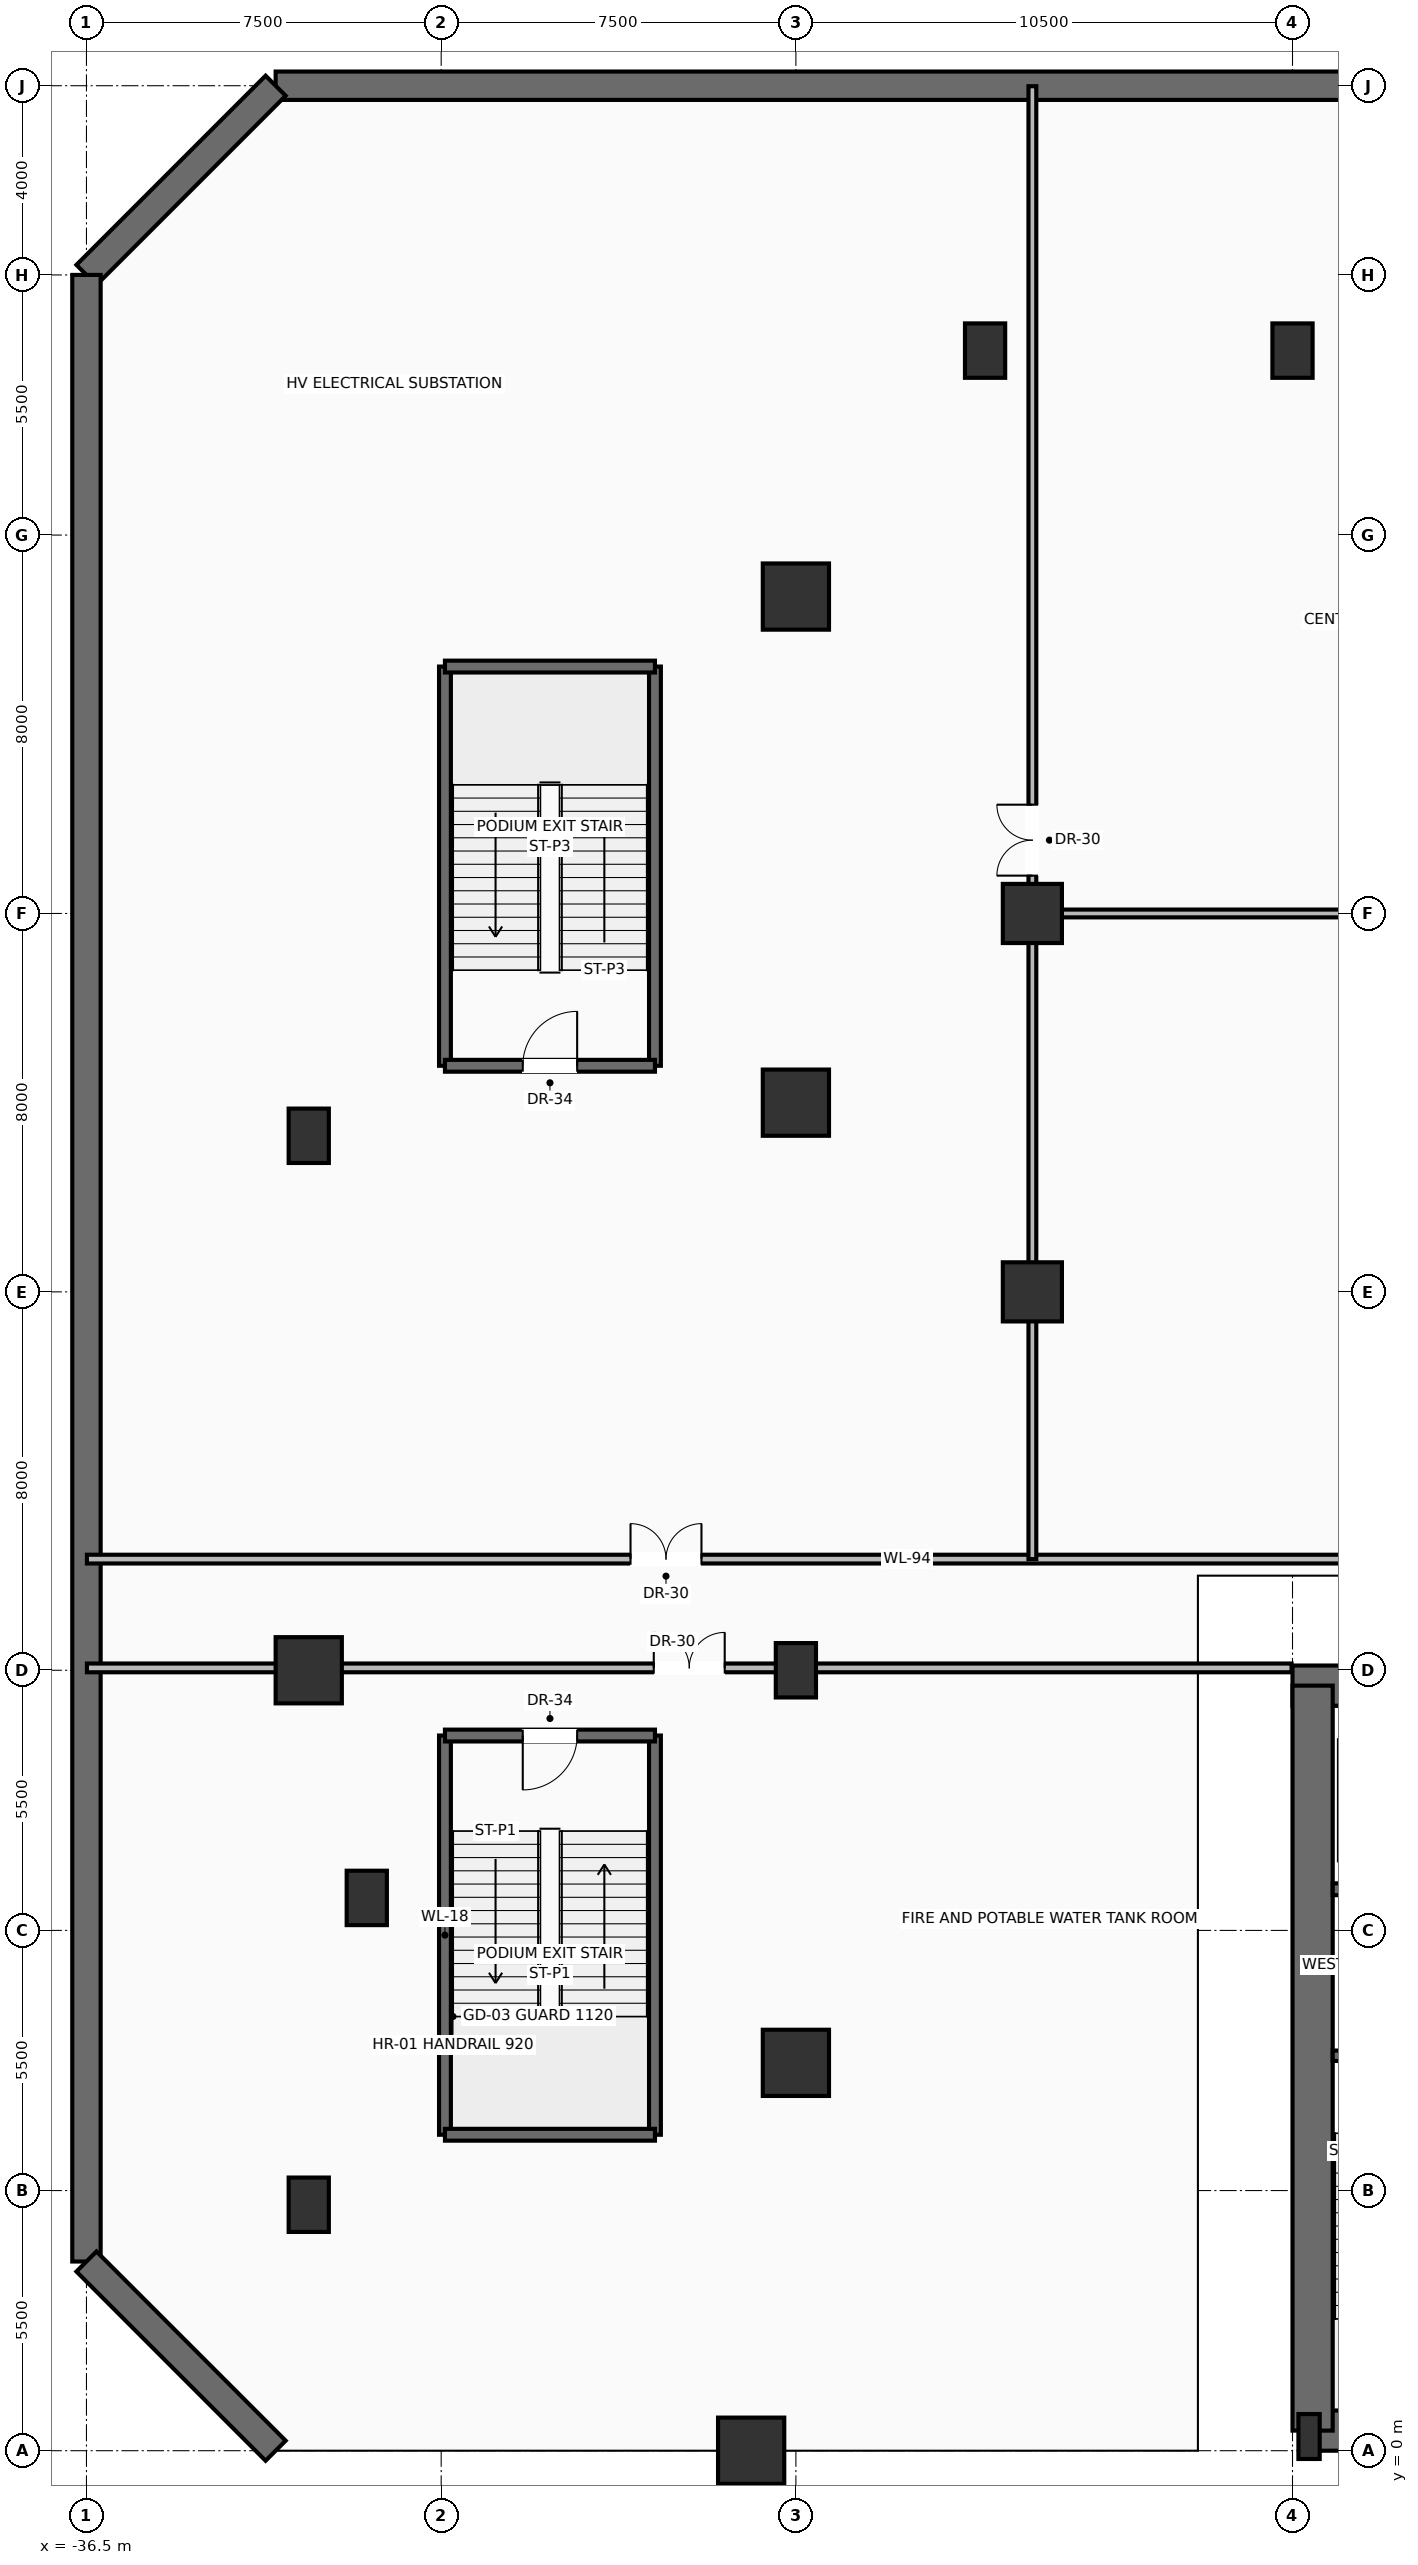
"""IFC4 building model, lengths in metres.
Left out: names, types, materials, properties, quantities, classifications, styles, units other than length and angle.
Written with IfcOpenShell. Run it as: python <this file> out.ifc"""

import sys

from ifc_helpers import new_model, si_unit, direction, frame, frame_2d, origin, origin_2d, place, context, subcontext, project, spatial, rectangle, hollow_rectangle, extrude, source, transform, mapped, element, fill, save


model = new_model("IFC4")
c1 = context("Model", 3, precision=1e-05, world=origin(), true_north=direction((0.0, 1.0)))
c2 = subcontext(c1, "Body", "Model", "MODEL_VIEW")
j1 = project(units=[si_unit("LENGTHUNIT", "METRE"), si_unit("PLANEANGLEUNIT", "RADIAN")], contexts=[c1])
p1 = place(None, origin())
s1 = spatial("IfcSite", under=j1, at=p1, CompositionType="ELEMENT")
p2 = place(p1, origin())
s2 = spatial("IfcBuilding", under=s1, at=p2, CompositionType="ELEMENT")
p3 = place(p2, frame((0.0, 0.0, -10.0)))
s3 = spatial("IfcBuildingStorey", under=s2, at=p3, CompositionType="ELEMENT", Elevation=-10.0)
p4 = place(p3, frame((32.5, 50.0, 0.0), z_axis=(0.0, 0.0, 1.0), x_axis=(-1.0, 0.0, 0.0)))
e1 = element("IfcWall", 1, at=p4, inside=s3, PredefinedType="SOLIDWALL", context=c2, shape_type="SweptSolid", body=[
    extrude(rectangle(XDim=65.0, YDim=0.6, at=frame_2d((32.5, 0.0))), origin(), (0.0, 0.0, 1.0), 4.6),
])
p5 = place(p3, frame((-32.5, 50.0, 0.0), z_axis=(0.0, 0.0, 1.0), x_axis=(-0.707106781187, -0.707106781187, 0.0)))
e2 = element("IfcWall", 2, at=p5, inside=s3, PredefinedType="SOLIDWALL", context=c2, shape_type="SweptSolid", body=[
    extrude(rectangle(XDim=5.657, YDim=0.6, at=frame_2d((2.828, 0.0))), origin(), (0.0, 0.0, 1.0), 4.6),
])
p6 = place(p3, frame((-36.5, 46.0, 0.0), z_axis=(0.0, 0.0, 1.0), x_axis=(0.0, -1.0, 0.0)))
e3 = element("IfcWall", 3, at=p6, inside=s3, PredefinedType="SOLIDWALL", context=c2, shape_type="SweptSolid", body=[
    extrude(rectangle(XDim=42.0, YDim=0.6, at=frame_2d((21.0, 0.0))), origin(), (0.0, 0.0, 1.0), 4.6),
])
p7 = place(p3, frame((-36.5, 4.0, 0.0), z_axis=(0.0, 0.0, 1.0), x_axis=(0.707106781187, -0.707106781187, 0.0)))
e4 = element("IfcWall", 4, at=p7, inside=s3, PredefinedType="SOLIDWALL", context=c2, shape_type="SweptSolid", body=[
    extrude(rectangle(XDim=5.657, YDim=0.6, at=frame_2d((2.828, 0.0))), origin(), (0.0, 0.0, 1.0), 4.6),
])
p8 = place(p3, frame((-10.65, 0.425, 0.0), z_axis=(0.0, 0.0, 1.0), x_axis=(1.0, 0.0, 0.0)))
e5 = element("IfcWall", 5, at=p8, inside=s3, PredefinedType="SHEAR", context=c2, shape_type="SweptSolid", body=[
    extrude(rectangle(XDim=21.3, YDim=0.85, at=frame_2d((10.65, 0.0))), origin(), (0.0, 0.0, 1.0), 4.6),
])
p9 = place(p3, frame((-11.0, 16.175, 0.0), z_axis=(0.0, 0.0, 1.0), x_axis=(1.0, 0.0, 0.0)))
e6 = element("IfcWall", 6, at=p9, inside=s3, PredefinedType="SHEAR", context=c2, shape_type="SweptSolid", body=[
    extrude(rectangle(XDim=22.0, YDim=0.85, at=frame_2d((11.0, 0.0))), origin(), (0.0, 0.0, 1.0), 4.6),
])
p10 = place(p9, frame((3.57, 0.0, 0.0)))
e7 = element("IfcOpeningElement", 7, at=p10, cuts=e6, PredefinedType="OPENING", context=c2, shape_type="SweptSolid", body=[
    extrude(rectangle(XDim=1.3, YDim=2.3, at=frame_2d((0.65, 1.15))), frame((0.0, 0.435, 0.0), z_axis=(0.0, -1.0, 0.0), x_axis=(1.0, 0.0, 0.0)), (0.0, 0.0, 1.0), 0.87),
])
p11 = place(p9, frame((10.0, 0.0, 0.0)))
e8 = element("IfcOpeningElement", 8, at=p11, cuts=e6, PredefinedType="OPENING", context=c2, shape_type="SweptSolid", body=[
    extrude(rectangle(XDim=2.0, YDim=2.4, at=frame_2d((1.0, 1.2))), frame((0.0, 0.435, 0.0), z_axis=(0.0, -1.0, 0.0), x_axis=(1.0, 0.0, 0.0)), (0.0, 0.0, 1.0), 0.87),
])
p12 = place(p3, frame((-10.575, 0.425, 0.0), z_axis=(0.0, 0.0, 1.0), x_axis=(0.0, 1.0, 0.0)))
e9 = element("IfcWall", 9, at=p12, inside=s3, PredefinedType="SHEAR", context=c2, shape_type="SweptSolid", body=[
    extrude(rectangle(XDim=15.75, YDim=0.85, at=frame_2d((7.875, 0.0))), origin(), (0.0, 0.0, 1.0), 4.6),
])
m1 = source(origin(), c2, "Body", "SweptSolid", [
    extrude(rectangle(XDim=0.45, YDim=0.95, at=origin_2d()), origin(), (0.0, 0.0, 1.0), 5.0),
])
p13 = place(p3, frame((-10.65, 0.3, 0.0), z_axis=(0.0, 0.0, 1.0), x_axis=(1.0, 0.0, 0.0)))
e10 = element("IfcColumn", 10, at=p13, inside=s3, PredefinedType="PILASTER", context=c2, shape_type="MappedRepresentation", body=[
    mapped(m1, transform((0.0, 0.0, 0.0), scale=1.0)),
])
m2 = source(origin(), c2, "Body", "SweptSolid", [
    extrude(hollow_rectangle(XDim=1.4, YDim=1.4, WallThickness=0.07, at=origin_2d()), origin(), (0.0, 0.0, 1.0), 5.0),
])
for number, where, z_axis, x_axis in (
    (11, (-22.446, 0.0, 0.0), (0.0, 0.0, 1.0), (1.0, 0.0, 0.0)),
    (12, (-21.5, 8.2, 0.0), (0.0, 0.0, 1.0), (1.0, 0.0, 0.0)),
    (13, (-31.8, 16.5, 0.0), (0.0, 0.0, 1.0), (1.0, 0.0, 0.0)),
    (14, (-21.5, 28.5, 0.0), (0.0, 0.0, 1.0), (1.0, 0.0, 0.0)),
    (15, (-21.5, 39.2, 0.0), (0.0, 0.0, 1.0), (1.0, 0.0, 0.0)),
):
    element("IfcColumn", number, at=place(p3, frame(where, z_axis=z_axis, x_axis=x_axis)), inside=s3, PredefinedType="COLUMN", context=c2, shape_type="MappedRepresentation", body=[
        mapped(m2, transform((0.0, 0.0, 0.0), scale=1.0)),
    ])
m3 = source(origin(), c2, "Body", "SweptSolid", [
    extrude(rectangle(XDim=0.85, YDim=1.15, at=origin_2d()), origin(), (0.0, 0.0, 1.0), 5.0),
])
for number, where, z_axis, x_axis in (
    (16, (-11.0, 44.4, 0.0), (0.0, 0.0, 1.0), (1.0, 0.0, 0.0)),
    (17, (-21.5, 16.5, 0.0), (0.0, 0.0, 1.0), (1.0, 0.0, 0.0)),
    (18, (-31.8, 5.2, 0.0), (0.0, 0.0, 1.0), (1.0, 0.0, 0.0)),
    (19, (-31.8, 27.8, 0.0), (0.0, 0.0, 1.0), (1.0, 0.0, 0.0)),
    (20, (-17.5, 44.4, 0.0), (0.0, 0.0, 1.0), (1.0, 0.0, 0.0)),
    (21, (-30.573, 11.687, 0.0), (0.0, 0.0, 1.0), (1.0, 0.0, 0.0)),
):
    element("IfcColumn", number, at=place(p3, frame(where, z_axis=z_axis, x_axis=x_axis)), inside=s3, PredefinedType="COLUMN", context=c2, shape_type="MappedRepresentation", body=[
        mapped(m3, transform((0.0, 0.0, 0.0), scale=1.0)),
    ])
m4 = source(origin(), c2, "Body", "SweptSolid", [
    extrude(rectangle(XDim=1.25, YDim=1.25, at=origin_2d()), origin(), (0.0, 0.0, 1.0), 5.0),
])
for number, where, z_axis, x_axis in (
    (22, (-16.5, 24.5, 0.0), (0.0, 0.0, 1.0), (1.0, 0.0, 0.0)),
    (23, (-16.5, 32.5, 0.0), (0.0, 0.0, 1.0), (1.0, 0.0, 0.0)),
):
    element("IfcColumn", number, at=place(p3, frame(where, z_axis=z_axis, x_axis=x_axis)), inside=s3, PredefinedType="COLUMN", context=c2, shape_type="MappedRepresentation", body=[
        mapped(m4, transform((0.0, 0.0, 0.0), scale=1.0)),
    ])
p14 = place(p3, frame((-5.5, 8.35, 0.0), z_axis=(0.0, 0.0, 1.0), x_axis=(-1.0, 0.0, 0.0)))
e24 = element("IfcWall", 24, at=p14, inside=s3, PredefinedType="SOLIDWALL", context=c2, shape_type="SweptSolid", body=[
    extrude(rectangle(XDim=4.65, YDim=0.22, at=frame_2d((2.325, 0.0))), origin(), (0.0, 0.0, 1.0), 4.6),
])
p15 = place(p14, frame((2.5, 0.0, 0.0)))
e25 = element("IfcOpeningElement", 25, at=p15, cuts=e24, PredefinedType="OPENING", context=c2, shape_type="SweptSolid", body=[
    extrude(rectangle(XDim=1.15, YDim=2.2, at=frame_2d((0.575, 1.1))), frame((0.0, 0.12, 0.0), z_axis=(0.0, -1.0, 0.0), x_axis=(1.0, 0.0, 0.0)), (0.0, 0.0, 1.0), 0.24),
])
p16 = place(p3, frame((-5.5, 11.87, 0.0), z_axis=(0.0, 0.0, 1.0), x_axis=(-1.0, 0.0, 0.0)))
e26 = element("IfcWall", 26, at=p16, inside=s3, PredefinedType="SOLIDWALL", context=c2, shape_type="SweptSolid", body=[
    extrude(rectangle(XDim=4.65, YDim=0.25, at=frame_2d((2.325, 0.0))), origin(), (0.0, 0.0, 1.0), 4.6),
])
p17 = place(p16, frame((2.95, 0.0, 0.0)))
e27 = element("IfcOpeningElement", 27, at=p17, cuts=e26, PredefinedType="OPENING", context=c2, shape_type="SweptSolid", body=[
    extrude(rectangle(XDim=1.2, YDim=2.25, at=frame_2d((0.6, 1.125))), frame((0.0, 0.135, 0.0), z_axis=(0.0, -1.0, 0.0), x_axis=(1.0, 0.0, 0.0)), (0.0, 0.0, 1.0), 0.27),
])
for number, where, z_axis, x_axis in (
    (28, (-28.92, 6.68, 0.0), (0.0, 0.0, 1.0), (0.0, 1.0, 0.0)),
    (29, (-24.48, 6.68, 0.0), (0.0, 0.0, 1.0), (0.0, 1.0, 0.0)),
):
    element("IfcWall", number, at=place(p3, frame(where, z_axis=z_axis, x_axis=x_axis)), inside=s3, PredefinedType="SOLIDWALL", context=c2, shape_type="SweptSolid", body=[
        extrude(rectangle(XDim=8.44, YDim=0.25, at=frame_2d((4.22, 0.0))), origin(), (0.0, 0.0, 1.0), 4.6),
    ])
p18 = place(p3, frame((-28.92, 6.68, 0.0), z_axis=(0.0, 0.0, 1.0), x_axis=(1.0, 0.0, 0.0)))
e30 = element("IfcWall", 30, at=p18, inside=s3, PredefinedType="SOLIDWALL", context=c2, shape_type="SweptSolid", body=[
    extrude(rectangle(XDim=4.44, YDim=0.25, at=frame_2d((2.22, 0.0))), origin(), (0.0, 0.0, 1.0), 4.6),
])
p19 = place(p3, frame((-24.48, 15.12, 0.0), z_axis=(0.0, 0.0, 1.0), x_axis=(-1.0, 0.0, 0.0)))
e31 = element("IfcWall", 31, at=p19, inside=s3, PredefinedType="SOLIDWALL", context=c2, shape_type="SweptSolid", body=[
    extrude(rectangle(XDim=4.44, YDim=0.25, at=frame_2d((2.22, 0.0))), origin(), (0.0, 0.0, 1.0), 4.6),
])
p20 = place(p19, frame((1.645, 0.0, 0.0)))
e32 = element("IfcOpeningElement", 32, at=p20, cuts=e31, PredefinedType="OPENING", context=c2, shape_type="SweptSolid", body=[
    extrude(rectangle(XDim=1.15, YDim=2.2, at=frame_2d((0.575, 1.1))), frame((0.0, 0.135, 0.0), z_axis=(0.0, -1.0, 0.0), x_axis=(1.0, 0.0, 0.0)), (0.0, 0.0, 1.0), 0.27),
])
for number, where, z_axis, x_axis in (
    (33, (-28.92, 29.28, 0.0), (0.0, 0.0, 1.0), (0.0, 1.0, 0.0)),
    (34, (-24.48, 29.28, 0.0), (0.0, 0.0, 1.0), (0.0, 1.0, 0.0)),
):
    element("IfcWall", number, at=place(p3, frame(where, z_axis=z_axis, x_axis=x_axis)), inside=s3, PredefinedType="SOLIDWALL", context=c2, shape_type="SweptSolid", body=[
        extrude(rectangle(XDim=8.44, YDim=0.25, at=frame_2d((4.22, 0.0))), origin(), (0.0, 0.0, 1.0), 4.6),
    ])
p21 = place(p3, frame((-28.92, 29.28, 0.0), z_axis=(0.0, 0.0, 1.0), x_axis=(1.0, 0.0, 0.0)))
e35 = element("IfcWall", 35, at=p21, inside=s3, PredefinedType="SOLIDWALL", context=c2, shape_type="SweptSolid", body=[
    extrude(rectangle(XDim=4.44, YDim=0.25, at=frame_2d((2.22, 0.0))), origin(), (0.0, 0.0, 1.0), 4.6),
])
p22 = place(p21, frame((1.645, 0.0, 0.0)))
e36 = element("IfcOpeningElement", 36, at=p22, cuts=e35, PredefinedType="OPENING", context=c2, shape_type="SweptSolid", body=[
    extrude(rectangle(XDim=1.15, YDim=2.2, at=frame_2d((0.575, 1.1))), frame((0.0, 0.135, 0.0), z_axis=(0.0, -1.0, 0.0), x_axis=(1.0, 0.0, 0.0)), (0.0, 0.0, 1.0), 0.27),
])
p23 = place(p3, frame((-24.48, 37.72, 0.0), z_axis=(0.0, 0.0, 1.0), x_axis=(-1.0, 0.0, 0.0)))
e37 = element("IfcWall", 37, at=p23, inside=s3, PredefinedType="SOLIDWALL", context=c2, shape_type="SweptSolid", body=[
    extrude(rectangle(XDim=4.44, YDim=0.25, at=frame_2d((2.22, 0.0))), origin(), (0.0, 0.0, 1.0), 4.6),
])
p24 = place(p3, frame((-36.49, 16.55, 0.0), z_axis=(0.0, 0.0, 1.0), x_axis=(1.0, 0.0, 0.0)))
e38 = element("IfcWall", 38, at=p24, inside=s3, PredefinedType="PARTITIONING", context=c2, shape_type="SweptSolid", body=[
    extrude(rectangle(XDim=25.47, YDim=0.185, at=frame_2d((12.735, 0.0))), origin(), (0.0, 0.0, 1.0), 3.552),
])
p25 = place(p24, frame((11.985, 0.0, 0.0)))
e39 = element("IfcOpeningElement", 39, at=p25, cuts=e38, PredefinedType="OPENING", context=c2, shape_type="SweptSolid", body=[
    extrude(rectangle(XDim=1.5, YDim=2.25, at=frame_2d((0.75, 1.125))), frame((0.0, 0.103, 0.0), z_axis=(0.0, -1.0, 0.0), x_axis=(1.0, 0.0, 0.0)), (0.0, 0.0, 1.0), 0.205),
])
p26 = place(p3, frame((-36.49, 18.85, 0.0), z_axis=(0.0, 0.0, 1.0), x_axis=(1.0, 0.0, 0.0)))
e40 = element("IfcWall", 40, at=p26, inside=s3, PredefinedType="PARTITIONING", context=c2, shape_type="SweptSolid", body=[
    extrude(rectangle(XDim=34.69, YDim=0.185, at=frame_2d((17.345, 0.0))), origin(), (0.0, 0.0, 1.0), 3.552),
])
p27 = place(p26, frame((11.493, 0.0, 0.0)))
e41 = element("IfcOpeningElement", 41, at=p27, cuts=e40, PredefinedType="OPENING", context=c2, shape_type="SweptSolid", body=[
    extrude(rectangle(XDim=1.5, YDim=2.25, at=frame_2d((0.75, 1.125))), frame((0.0, 0.103, 0.0), z_axis=(0.0, -1.0, 0.0), x_axis=(1.0, 0.0, 0.0)), (0.0, 0.0, 1.0), 0.205),
])
p28 = place(p3, frame((-16.5, 18.85, 0.0), z_axis=(0.0, 0.0, 1.0), x_axis=(0.0, 1.0, 0.0)))
e42 = element("IfcWall", 42, at=p28, inside=s3, PredefinedType="PARTITIONING", context=c2, shape_type="SweptSolid", body=[
    extrude(rectangle(XDim=31.14, YDim=0.165, at=frame_2d((15.57, 0.0))), origin(), (0.0, 0.0, 1.0), 3.552),
])
p29 = place(p28, frame((14.45, 0.0, 0.0)))
e43 = element("IfcOpeningElement", 43, at=p29, cuts=e42, PredefinedType="OPENING", context=c2, shape_type="SweptSolid", body=[
    extrude(rectangle(XDim=1.5, YDim=2.25, at=frame_2d((0.75, 1.125))), frame((0.0, 0.093, 0.0), z_axis=(0.0, -1.0, 0.0), x_axis=(1.0, 0.0, 0.0)), (0.0, 0.0, 1.0), 0.185),
])
p30 = place(p3, frame((-16.5, 32.5, 0.0), z_axis=(0.0, 0.0, 1.0), x_axis=(1.0, 0.0, 0.0)))
e44 = element("IfcWall", 44, at=p30, inside=s3, PredefinedType="PARTITIONING", context=c2, shape_type="SweptSolid", body=[
    extrude(rectangle(XDim=33.0, YDim=0.165, at=frame_2d((16.5, 0.0))), origin(), (0.0, 0.0, 1.0), 3.552),
])
p31 = place(p30, frame((15.75, 0.0, 0.0)))
e45 = element("IfcOpeningElement", 45, at=p31, cuts=e44, PredefinedType="OPENING", context=c2, shape_type="SweptSolid", body=[
    extrude(rectangle(XDim=1.5, YDim=2.25, at=frame_2d((0.75, 1.125))), frame((0.0, 0.093, 0.0), z_axis=(0.0, -1.0, 0.0), x_axis=(1.0, 0.0, 0.0)), (0.0, 0.0, 1.0), 0.185),
])
m5 = source(origin(), c2, "Body", "SweptSolid", [
    extrude(rectangle(XDim=1.15, YDim=2.2, at=frame_2d((0.575, 1.1))), frame((0.0, 0.025, 0.0), z_axis=(0.0, -1.0, 0.0), x_axis=(1.0, 0.0, 0.0)), (0.0, 0.0, 1.0), 0.05),
])
p32 = place(p20, origin())
e46 = element("IfcDoor", 46, at=p32, inside=s3, OperationType="SINGLE_SWING_RIGHT", PredefinedType="DOOR", context=c2, shape_type="MappedRepresentation", body=[
    mapped(m5, transform((0.0, 0.0, 0.0), scale=1.0)),
])
fill(e32, e46)
p33 = place(p22, origin())
e47 = element("IfcDoor", 47, at=p33, inside=s3, OperationType="SINGLE_SWING_RIGHT", PredefinedType="DOOR", context=c2, shape_type="MappedRepresentation", body=[
    mapped(m5, transform((0.0, 0.0, 0.0), scale=1.0)),
])
fill(e36, e47)
m6 = source(origin(), c2, "Body", "SweptSolid", [
    extrude(rectangle(XDim=1.5, YDim=2.25, at=frame_2d((0.75, 1.125))), frame((0.0, 0.025, 0.0), z_axis=(0.0, -1.0, 0.0), x_axis=(1.0, 0.0, 0.0)), (0.0, 0.0, 1.0), 0.05),
])
p34 = place(p25, origin())
e48 = element("IfcDoor", 48, at=p34, inside=s3, OperationType="DOUBLE_DOOR_SINGLE_SWING", PredefinedType="DOOR", context=c2, shape_type="MappedRepresentation", body=[
    mapped(m6, transform((0.0, 0.0, 0.0), scale=1.0)),
])
fill(e39, e48)
p35 = place(p27, origin())
e49 = element("IfcDoor", 49, at=p35, inside=s3, OperationType="DOUBLE_DOOR_SINGLE_SWING", PredefinedType="DOOR", context=c2, shape_type="MappedRepresentation", body=[
    mapped(m6, transform((0.0, 0.0, 0.0), scale=1.0)),
])
fill(e41, e49)
p36 = place(p29, origin())
e50 = element("IfcDoor", 50, at=p36, inside=s3, OperationType="DOUBLE_DOOR_SINGLE_SWING", PredefinedType="DOOR", context=c2, shape_type="MappedRepresentation", body=[
    mapped(m6, transform((0.0, 0.0, 0.0), scale=1.0)),
])
fill(e43, e50)
save(model, sys.argv[1])
